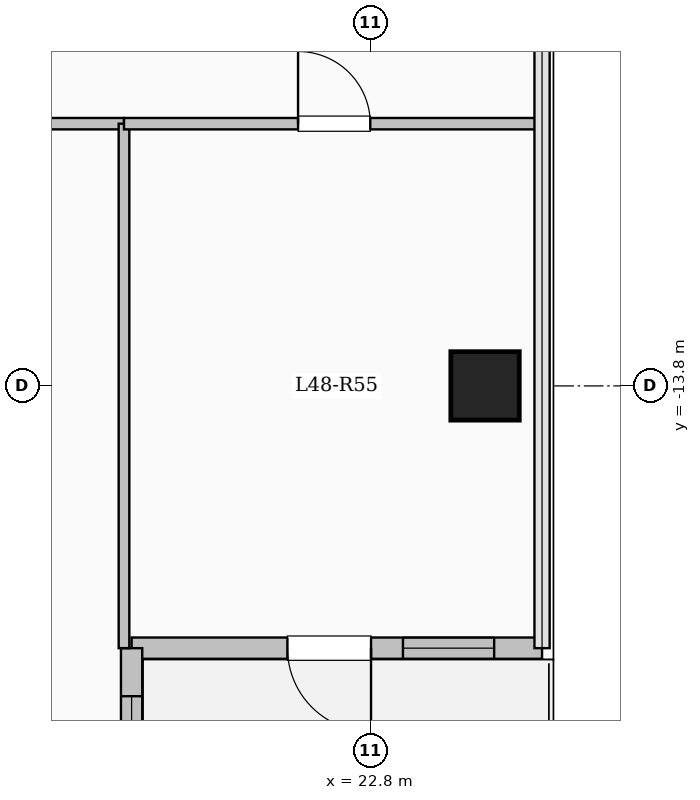
"""IFC4 building model, lengths in metres.
Left out: names, types, materials, properties, quantities, classifications, styles, units other than length and angle.
Written with IfcOpenShell. Run it as: python <this file> out.ifc"""

import sys

from ifc_helpers import new_model, si_unit, direction, frame, frame_2d, origin, origin_2d, place, context, subcontext, project, spatial, rectangle, extrude, element, fill, save


model = new_model("IFC4")
c1 = context("Model", 3, precision=1e-05, world=origin(), true_north=direction((0.0, 1.0)))
c2 = subcontext(c1, "Body", "Model", "MODEL_VIEW")
j1 = project(units=[si_unit("LENGTHUNIT", "METRE"), si_unit("PLANEANGLEUNIT", "RADIAN")], contexts=[c1])
p1 = place(None, origin())
s1 = spatial("IfcSite", under=j1, at=p1, CompositionType="ELEMENT")
p2 = place(p1, origin())
s2 = spatial("IfcBuilding", under=s1, at=p2, CompositionType="ELEMENT")
p3 = place(p2, frame((0.0, 0.0, 177.3)))
s3 = spatial("IfcBuildingStorey", under=s2, at=p3, CompositionType="ELEMENT", Elevation=177.3)
p4 = place(p3, frame((24.3, -13.8, 0.0), z_axis=(0.0, 0.0, 1.0), x_axis=(1.0, 0.0, 0.0)))
e1 = element("IfcColumn", 1, at=p4, inside=s3, PredefinedType="COLUMN", context=c2, shape_type="SweptSolid", body=[
    extrude(rectangle(XDim=0.9, YDim=0.9, at=origin_2d()), origin(), (0.0, 0.0, 1.0), 4.5),
])
p5 = place(p3, frame((25.05, -17.25, 0.0), z_axis=(0.0, 0.0, 1.0), x_axis=(-1.0, 0.0, 0.0)))
e2 = element("IfcWall", 2, at=p5, inside=s3, PredefinedType="SOLIDWALL", context=c2, shape_type="SweptSolid", body=[
    extrude(rectangle(XDim=5.4, YDim=0.28, at=frame_2d((2.7, 0.0))), origin(), (0.0, 0.0, 1.0), 4.2),
])
p6 = place(p5, frame((2.25, 0.0, 0.0)))
e3 = element("IfcOpeningElement", 3, at=p6, cuts=e2, PredefinedType="OPENING", context=c2, shape_type="SweptSolid", body=[
    extrude(rectangle(XDim=1.1, YDim=2.2, at=frame_2d((0.55, 1.1))), frame((0.0, 0.15, 0.0), z_axis=(0.0, -1.0, 0.0), x_axis=(1.0, 0.0, 0.0)), (0.0, 0.0, 1.0), 0.3),
])
p7 = place(p5, frame((0.63, 0.0, 0.95)))
e4 = element("IfcOpeningElement", 4, at=p7, cuts=e2, PredefinedType="OPENING", context=c2, shape_type="SweptSolid", body=[
    extrude(rectangle(XDim=1.2, YDim=1.5, at=frame_2d((0.6, 0.75))), frame((0.0, 0.15, 0.0), z_axis=(0.0, -1.0, 0.0), x_axis=(1.0, 0.0, 0.0)), (0.0, 0.0, 1.0), 0.3),
])
p8 = place(p3, frame((19.65, -17.25, 0.0), z_axis=(0.0, 0.0, 1.0), x_axis=(0.0, -1.0, 0.0)))
e5 = element("IfcWall", 5, at=p8, inside=s3, PredefinedType="SOLIDWALL", context=c2, shape_type="SweptSolid", body=[
    extrude(rectangle(XDim=3.9, YDim=0.28, at=frame_2d((1.95, 0.0))), origin(), (0.0, 0.0, 1.0), 4.2),
])
p9 = place(p8, frame((0.632, 0.0, 0.85)))
e6 = element("IfcOpeningElement", 6, at=p9, cuts=e5, PredefinedType="OPENING", context=c2, shape_type="SweptSolid", body=[
    extrude(rectangle(XDim=2.6, YDim=2.4, at=frame_2d((1.3, 1.2))), frame((0.0, 0.15, 0.0), z_axis=(0.0, -1.0, 0.0), x_axis=(1.0, 0.0, 0.0)), (0.0, 0.0, 1.0), 0.3),
])
p10 = place(p3, frame((8.55, -10.35, 0.0), z_axis=(0.0, 0.0, 1.0), x_axis=(1.0, 0.0, 0.0)))
e7 = element("IfcWall", 7, at=p10, inside=s3, PredefinedType="PARTITIONING", context=c2, shape_type="SweptSolid", body=[
    extrude(rectangle(XDim=11.0, YDim=0.15, at=frame_2d((5.5, 0.0))), origin(), (0.0, 0.0, 1.0), 4.2),
])
p11 = place(p10, frame((1.1, 0.0, 0.0)))
e8 = element("IfcOpeningElement", 8, at=p11, cuts=e7, PredefinedType="OPENING", context=c2, shape_type="SweptSolid", body=[
    extrude(rectangle(XDim=1.08, YDim=2.15, at=frame_2d((0.54, 1.075))), frame((0.0, 0.085, 0.0), z_axis=(0.0, -1.0, 0.0), x_axis=(1.0, 0.0, 0.0)), (0.0, 0.0, 1.0), 0.17),
])
p12 = place(p10, frame((5.649, 0.0, 0.0)))
e9 = element("IfcOpeningElement", 9, at=p12, cuts=e7, PredefinedType="OPENING", context=c2, shape_type="SweptSolid", body=[
    extrude(rectangle(XDim=1.2, YDim=2.15, at=frame_2d((0.6, 1.075))), frame((0.0, 0.085, 0.0), z_axis=(0.0, -1.0, 0.0), x_axis=(1.0, 0.0, 0.0)), (0.0, 0.0, 1.0), 0.17),
])
p13 = place(p3, frame((19.55, -17.25, 0.0), z_axis=(0.0, 0.0, 1.0), x_axis=(0.0, 1.0, 0.0)))
e10 = element("IfcWall", 10, at=p13, inside=s3, PredefinedType="PARTITIONING", context=c2, shape_type="SweptSolid", body=[
    extrude(rectangle(XDim=6.9, YDim=0.14, at=frame_2d((3.45, 0.0))), origin(), (0.0, 0.0, 1.0), 4.2),
])
p14 = place(p3, frame((19.55, -10.35, 0.0), z_axis=(0.0, 0.0, 1.0), x_axis=(1.0, 0.0, 0.0)))
e11 = element("IfcWall", 11, at=p14, inside=s3, PredefinedType="PARTITIONING", context=c2, shape_type="SweptSolid", body=[
    extrude(rectangle(XDim=5.53, YDim=0.15, at=frame_2d((2.765, 0.0))), origin(), (0.0, 0.0, 1.0), 4.2),
])
p15 = place(p14, frame((2.29, 0.0, 0.0)))
e12 = element("IfcOpeningElement", 12, at=p15, cuts=e11, PredefinedType="OPENING", context=c2, shape_type="SweptSolid", body=[
    extrude(rectangle(XDim=0.95, YDim=2.15, at=frame_2d((0.475, 1.075))), frame((0.0, 0.085, 0.0), z_axis=(0.0, -1.0, 0.0), x_axis=(1.0, 0.0, 0.0)), (0.0, 0.0, 1.0), 0.17),
])
p16 = place(p6, origin())
e13 = element("IfcDoor", 13, at=p16, inside=s3, OperationType="SINGLE_SWING_LEFT", PredefinedType="DOOR", context=c2, shape_type="SweptSolid", body=[
    extrude(rectangle(XDim=1.1, YDim=2.2, at=frame_2d((0.55, 1.1))), frame((0.0, 0.025, 0.0), z_axis=(0.0, -1.0, 0.0), x_axis=(1.0, 0.0, 0.0)), (0.0, 0.0, 1.0), 0.05),
])
fill(e3, e13)
p17 = place(p7, origin())
e14 = element("IfcWindow", 14, at=p17, inside=s3, PartitioningType="SINGLE_PANEL", PredefinedType="WINDOW", context=c2, shape_type="SweptSolid", body=[
    extrude(rectangle(XDim=1.2, YDim=1.5, at=frame_2d((0.6, 0.75))), frame((0.0, 0.03, 0.0), z_axis=(0.0, -1.0, 0.0), x_axis=(1.0, 0.0, 0.0)), (0.0, 0.0, 1.0), 0.06),
])
fill(e4, e14)
p18 = place(p9, origin())
e15 = element("IfcWindow", 15, at=p18, inside=s3, PartitioningType="SINGLE_PANEL", PredefinedType="WINDOW", context=c2, shape_type="SweptSolid", body=[
    extrude(rectangle(XDim=2.6, YDim=2.4, at=frame_2d((1.3, 1.2))), frame((0.0, 0.03, 0.0), z_axis=(0.0, -1.0, 0.0), x_axis=(1.0, 0.0, 0.0)), (0.0, 0.0, 1.0), 0.06),
])
fill(e6, e15)
p19 = place(p15, origin())
e16 = element("IfcDoor", 16, at=p19, inside=s3, OperationType="SINGLE_SWING_LEFT", PredefinedType="DOOR", context=c2, shape_type="SweptSolid", body=[
    extrude(rectangle(XDim=0.95, YDim=2.15, at=frame_2d((0.475, 1.075))), frame((0.0, 0.025, 0.0), z_axis=(0.0, -1.0, 0.0), x_axis=(1.0, 0.0, 0.0)), (0.0, 0.0, 1.0), 0.05),
])
fill(e12, e16)
save(model, sys.argv[1])
